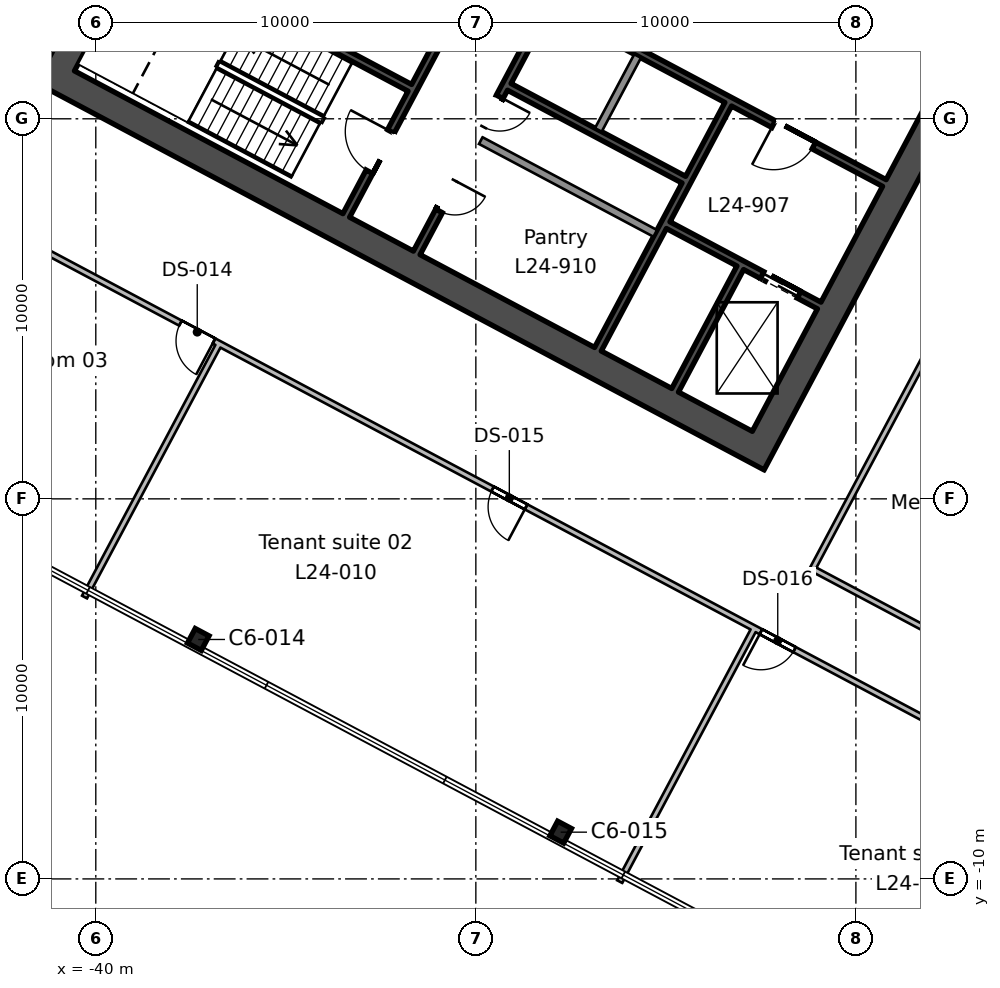
"""IFC4 building model, lengths in metres.
Left out: names, types, materials, properties, quantities, classifications, styles, units other than length and angle.
Written with IfcOpenShell. Run it as: python <this file> out.ifc"""

import sys

from ifc_helpers import new_model, si_unit, direction, frame, frame_2d, origin, origin_2d, place, context, subcontext, project, spatial, rectangle, i_section, extrude, element, fill, save


model = new_model("IFC4")
c1 = context("Model", 3, precision=1e-05, world=origin(), true_north=direction((0.0, 1.0)))
c2 = subcontext(c1, "Body", "Model", "MODEL_VIEW")
j1 = project(units=[si_unit("LENGTHUNIT", "METRE"), si_unit("PLANEANGLEUNIT", "RADIAN")], contexts=[c1])
p1 = place(None, origin())
s1 = spatial("IfcSite", under=j1, at=p1, CompositionType="ELEMENT")
p2 = place(p1, origin())
s2 = spatial("IfcBuilding", under=s1, at=p2, CompositionType="ELEMENT")
p3 = place(p2, frame((0.0, 0.0, 122.2)))
s3 = spatial("IfcBuildingStorey", under=s2, at=p3, CompositionType="ELEMENT", Elevation=122.2)
for number, where, z_axis, x_axis in (
    (1, (-27.768, -8.77, 0.0), (0.0, 0.0, 1.0), (0.883, -0.469, 0.0)),
    (2, (-37.304, -3.7, 0.0), (0.0, 0.0, 1.0), (0.883, -0.469, 0.0)),
):
    element("IfcColumn", number, at=place(p3, frame(where, z_axis=z_axis, x_axis=x_axis)), inside=s3, PredefinedType="COLUMN", context=c2, shape_type="SweptSolid", body=[
        extrude(i_section(OverallWidth=0.412, OverallDepth=0.434, WebThickness=0.036, FlangeThickness=0.057, FilletRadius=0.015, at=origin_2d()), origin(), (0.0, 0.0, 1.0), 4.0),
    ])
p4 = place(p3, frame((-13.498, 18.333, 0.0), z_axis=(0.0, 0.0, 1.0), x_axis=(-0.469469918705, -0.88294846703, 0.0)))
e3 = element("IfcWall", 3, at=p4, inside=s3, PredefinedType="SHEAR", context=c2, shape_type="SweptSolid", body=[
    extrude(rectangle(XDim=19.7, YDim=0.75, at=frame_2d((9.85, 0.0))), origin(), (0.0, 0.0, 1.0), 4.0),
])
p5 = place(p4, frame((6.85, 0.0, 0.0)))
e4 = element("IfcOpeningElement", 4, at=p5, cuts=e3, PredefinedType="OPENING", context=c2, shape_type="SweptSolid", body=[
    extrude(rectangle(XDim=2.4, YDim=2.4, at=frame_2d((1.2, 1.2))), frame((0.0, 0.385, 0.0), z_axis=(0.0, -1.0, 0.0), x_axis=(1.0, 0.0, 0.0)), (0.0, 0.0, 1.0), 0.77),
])
p6 = place(p3, frame((-31.996, 28.168, 0.0), z_axis=(0.0, 0.0, 1.0), x_axis=(-0.469479580143, -0.882943329908, 0.0)))
e5 = element("IfcWall", 5, at=p6, inside=s3, PredefinedType="SHEAR", context=c2, shape_type="SweptSolid", body=[
    extrude(rectangle(XDim=19.7, YDim=0.75, at=frame_2d((9.85, 0.0))), origin(), (0.0, 0.0, 1.0), 4.0),
])
p7 = place(p6, frame((10.45, 0.0, 0.0)))
e6 = element("IfcOpeningElement", 6, at=p7, cuts=e5, PredefinedType="OPENING", context=c2, shape_type="SweptSolid", body=[
    extrude(rectangle(XDim=2.4, YDim=2.4, at=frame_2d((1.2, 1.2))), frame((0.0, 0.385, 0.0), z_axis=(0.0, -1.0, 0.0), x_axis=(1.0, 0.0, 0.0)), (0.0, 0.0, 1.0), 0.77),
])
p8 = place(p3, frame((-22.902, 1.446, 0.0), z_axis=(0.0, 0.0, 1.0), x_axis=(-0.88294509198, 0.469476266226, 0.0)))
e7 = element("IfcWall", 7, at=p8, inside=s3, PredefinedType="SHEAR", context=c2, shape_type="SweptSolid", body=[
    extrude(rectangle(XDim=20.2, YDim=0.75, at=frame_2d((10.1, 0.0))), origin(), (0.0, 0.0, 1.0), 4.0),
])
p9 = place(p3, frame((-23.043, 6.08, 0.0), z_axis=(0.0, 0.0, 1.0), x_axis=(-0.469494272526, -0.882935517501, 0.0)))
e8 = element("IfcWall", 8, at=p9, inside=s3, PredefinedType="SHEAR", context=c2, shape_type="SweptSolid", body=[
    extrude(rectangle(XDim=3.65, YDim=0.2, at=frame_2d((1.825, 0.0))), origin(), (0.0, 0.0, 1.0), 4.0),
])
p10 = place(p3, frame((-23.36, 10.382, 0.0), z_axis=(0.0, 0.0, 1.0), x_axis=(-0.469480409012, -0.88294288918, 0.0)))
e9 = element("IfcWall", 9, at=p10, inside=s3, PredefinedType="SHEAR", context=c2, shape_type="SweptSolid", body=[
    extrude(rectangle(XDim=7.3, YDim=0.2, at=frame_2d((3.65, 0.0))), origin(), (0.0, 0.0, 1.0), 4.0),
])
p11 = place(p3, frame((-25.744, 11.65, 0.0), z_axis=(0.0, 0.0, 1.0), x_axis=(-0.469487830541, -0.882938942948, 0.0)))
e10 = element("IfcWall", 10, at=p11, inside=s3, PredefinedType="SOLIDWALL", context=c2, shape_type="SweptSolid", body=[
    extrude(rectangle(XDim=2.2, YDim=0.2, at=frame_2d((1.1, 0.0))), origin(), (0.0, 0.0, 1.0), 4.0),
])
p12 = place(p3, frame((-28.128, 12.917, 0.0), z_axis=(0.0, 0.0, 1.0), x_axis=(-0.469454336211, -0.882956752176, 0.0)))
e11 = element("IfcWall", 11, at=p12, inside=s3, PredefinedType="SHEAR", context=c2, shape_type="SweptSolid", body=[
    extrude(rectangle(XDim=7.3, YDim=0.2, at=frame_2d((3.65, 0.0))), origin(), (0.0, 0.0, 1.0), 4.0),
])
p13 = place(p12, frame((2.65, 0.0, 0.0)))
e12 = element("IfcOpeningElement", 12, at=p13, cuts=e11, PredefinedType="OPENING", context=c2, shape_type="SweptSolid", body=[
    extrude(rectangle(XDim=0.9, YDim=2.1, at=frame_2d((0.45, 1.05))), frame((0.0, 0.11, 0.0), z_axis=(0.0, -1.0, 0.0), x_axis=(1.0, 0.0, 0.0)), (0.0, 0.0, 1.0), 0.22),
])
p14 = place(p12, frame((5.15, 0.0, 0.0)))
e13 = element("IfcOpeningElement", 13, at=p14, cuts=e11, PredefinedType="OPENING", context=c2, shape_type="SweptSolid", body=[
    extrude(rectangle(XDim=0.9, YDim=2.1, at=frame_2d((0.45, 1.05))), frame((0.0, 0.11, 0.0), z_axis=(0.0, -1.0, 0.0), x_axis=(1.0, 0.0, 0.0)), (0.0, 0.0, 1.0), 0.22),
])
p15 = place(p3, frame((-29.982, 13.903, 0.0), z_axis=(0.0, 0.0, 1.0), x_axis=(-0.469454336211, -0.882956752176, 0.0)))
e14 = element("IfcWall", 14, at=p15, inside=s3, PredefinedType="SHEAR", context=c2, shape_type="SweptSolid", body=[
    extrude(rectangle(XDim=7.3, YDim=0.2, at=frame_2d((3.65, 0.0))), origin(), (0.0, 0.0, 1.0), 4.0),
])
p16 = place(p15, frame((4.8, 0.0, 0.0)))
e15 = element("IfcOpeningElement", 15, at=p16, cuts=e14, PredefinedType="OPENING", context=c2, shape_type="SweptSolid", body=[
    extrude(rectangle(XDim=1.2, YDim=2.1, at=frame_2d((0.6, 1.05))), frame((0.0, 0.11, 0.0), z_axis=(0.0, -1.0, 0.0), x_axis=(1.0, 0.0, 0.0)), (0.0, 0.0, 1.0), 0.22),
])
p17 = place(p3, frame((-19.252, 8.311, 0.0), z_axis=(0.0, 0.0, 1.0), x_axis=(-0.882955722218, 0.469456273365, 0.0)))
e16 = element("IfcWall", 16, at=p17, inside=s3, PredefinedType="SHEAR", context=c2, shape_type="SweptSolid", body=[
    extrude(rectangle(XDim=10.0, YDim=0.2, at=frame_2d((5.0, 0.0))), origin(), (0.0, 0.0, 1.0), 4.0),
])
p18 = place(p17, frame((2.1, 0.0, 0.0)))
e17 = element("IfcOpeningElement", 17, at=p18, cuts=e16, PredefinedType="OPENING", context=c2, shape_type="SweptSolid", body=[
    extrude(rectangle(XDim=1.2, YDim=2.1, at=frame_2d((0.6, 1.05))), frame((0.0, 0.11, 0.0), z_axis=(0.0, -1.0, 0.0), x_axis=(1.0, 0.0, 0.0)), (0.0, 0.0, 1.0), 0.22),
])
p19 = place(p3, frame((-24.528, 8.398, 0.0), z_axis=(0.0, 0.0, 1.0), x_axis=(-0.882953967957, 0.469459572775, 0.0)))
e18 = element("IfcWall", 18, at=p19, inside=s3, PredefinedType="SHEAR", context=c2, shape_type="SweptSolid", body=[
    extrude(rectangle(XDim=5.2, YDim=0.2, at=frame_2d((2.6, 0.0))), origin(), (0.0, 0.0, 1.0), 4.0),
])
p20 = place(p3, frame((-20.965, 5.088, 0.0), z_axis=(0.0, 0.0, 1.0), x_axis=(-0.882925986334, 0.469512196493, 0.0)))
e19 = element("IfcWall", 19, at=p20, inside=s3, PredefinedType="SHEAR", context=c2, shape_type="SweptSolid", body=[
    extrude(rectangle(XDim=4.5, YDim=0.2, at=frame_2d((2.25, 0.0))), origin(), (0.0, 0.0, 1.0), 4.0),
])
p21 = place(p20, frame((0.6, 0.0, 0.0)))
e20 = element("IfcOpeningElement", 20, at=p21, cuts=e19, PredefinedType="OPENING", context=c2, shape_type="SweptSolid", body=[
    extrude(rectangle(XDim=1.1, YDim=2.1, at=frame_2d((0.55, 1.05))), frame((0.0, 0.11, 0.0), z_axis=(0.0, -1.0, 0.0), x_axis=(1.0, 0.0, 0.0)), (0.0, 0.0, 1.0), 0.22),
])
p22 = place(p3, frame((-31.737, 10.816, 0.0), z_axis=(0.0, 0.0, 1.0), x_axis=(-0.882940221191, 0.469485426614, 0.0)))
e21 = element("IfcWall", 21, at=p22, inside=s3, PredefinedType="SHEAR", context=c2, shape_type="SweptSolid", body=[
    extrude(rectangle(XDim=8.0, YDim=0.2, at=frame_2d((4.0, 0.0))), origin(), (0.0, 0.0, 1.0), 4.0),
])
p23 = place(p3, frame((-25.28, 6.986, 0.0), z_axis=(0.0, 0.0, 1.0), x_axis=(-0.882934506056, 0.469496174655, 0.0)))
e22 = element("IfcWall", 22, at=p23, inside=s3, PredefinedType="SOLIDWALL", context=c2, shape_type="SweptSolid", body=[
    extrude(rectangle(XDim=5.2, YDim=0.2, at=frame_2d((2.6, 0.0))), origin(), (0.0, 0.0, 1.0), 4.0),
])
p24 = place(p3, frame((-36.752, 4.082, 0.0), z_axis=(0.0, 0.0, 1.0), x_axis=(-0.46955237308, -0.88290462052, 0.0)))
e23 = element("IfcWall", 23, at=p24, inside=s3, PredefinedType="PARTITIONING", context=c2, shape_type="SweptSolid", body=[
    extrude(rectangle(XDim=7.55, YDim=0.15, at=frame_2d((3.775, 0.0))), origin(), (0.0, 0.0, 1.0), 3.64),
])
p25 = place(p3, frame((-33.66, 30.844, 0.0), z_axis=(0.0, 0.0, 1.0), x_axis=(-0.469473234242, -0.882946704128, 0.0)))
e24 = element("IfcWall", 24, at=p25, inside=s3, PredefinedType="PARTITIONING", context=c2, shape_type="SweptSolid", body=[
    extrude(rectangle(XDim=22.862, YDim=0.15, at=frame_2d((11.431, 0.0))), origin(), (0.0, 0.0, 1.0), 3.64),
])
p26 = place(p3, frame((-13.8, -8.122, 0.0), z_axis=(0.0, 0.0, 1.0), x_axis=(-0.882950271686, 0.469466524611, 0.0)))
e25 = element("IfcWall", 25, at=p26, inside=s3, PredefinedType="PARTITIONING", context=c2, shape_type="SweptSolid", body=[
    extrude(rectangle(XDim=34.727, YDim=0.15, at=frame_2d((17.363, 0.0))), origin(), (0.0, 0.0, 1.0), 3.64),
])
p27 = place(p26, frame((26.15, 0.0, 0.0)))
e26 = element("IfcOpeningElement", 26, at=p27, cuts=e25, PredefinedType="OPENING", context=c2, shape_type="SweptSolid", body=[
    extrude(rectangle(XDim=1.0, YDim=2.1, at=frame_2d((0.5, 1.05))), frame((0.0, 0.085, 0.0), z_axis=(0.0, -1.0, 0.0), x_axis=(1.0, 0.0, 0.0)), (0.0, 0.0, 1.0), 0.17),
])
p28 = place(p26, frame((16.85, 0.0, 0.0)))
e27 = element("IfcOpeningElement", 27, at=p28, cuts=e25, PredefinedType="OPENING", context=c2, shape_type="SweptSolid", body=[
    extrude(rectangle(XDim=1.0, YDim=2.1, at=frame_2d((0.5, 1.05))), frame((0.0, 0.085, 0.0), z_axis=(0.0, -1.0, 0.0), x_axis=(1.0, 0.0, 0.0)), (0.0, 0.0, 1.0), 0.17),
])
p29 = place(p26, frame((8.851, 0.0, 0.0)))
e28 = element("IfcOpeningElement", 28, at=p29, cuts=e25, PredefinedType="OPENING", context=c2, shape_type="SweptSolid", body=[
    extrude(rectangle(XDim=1.0, YDim=2.1, at=frame_2d((0.5, 1.05))), frame((0.0, 0.085, 0.0), z_axis=(0.0, -1.0, 0.0), x_axis=(1.0, 0.0, 0.0)), (0.0, 0.0, 1.0), 0.17),
])
p30 = place(p3, frame((-22.67, -3.406, 0.0), z_axis=(0.0, 0.0, 1.0), x_axis=(-0.469451537303, -0.882958240306, 0.0)))
e29 = element("IfcWall", 29, at=p30, inside=s3, PredefinedType="PARTITIONING", context=c2, shape_type="SweptSolid", body=[
    extrude(rectangle(XDim=7.55, YDim=0.15, at=frame_2d((3.775, 0.0))), origin(), (0.0, 0.0, 1.0), 3.64),
])
p31 = place(p3, frame((-21.139, -1.841, 0.0), z_axis=(0.0, 0.0, 1.0), x_axis=(0.46947923089, 0.882943515613, 0.0)))
e30 = element("IfcWall", 30, at=p31, inside=s3, PredefinedType="PARTITIONING", context=c2, shape_type="SweptSolid", body=[
    extrude(rectangle(XDim=23.1, YDim=0.15, at=frame_2d((11.55, 0.0))), origin(), (0.0, 0.0, 1.0), 3.64),
])
p32 = place(p31, frame((11.05, 0.0, 0.0)))
e31 = element("IfcOpeningElement", 31, at=p32, cuts=e30, PredefinedType="OPENING", context=c2, shape_type="SweptSolid", body=[
    extrude(rectangle(XDim=1.0, YDim=2.1, at=frame_2d((0.5, 1.05))), frame((0.0, 0.085, 0.0), z_axis=(0.0, -1.0, 0.0), x_axis=(1.0, 0.0, 0.0)), (0.0, 0.0, 1.0), 0.17),
])
p33 = place(p3, frame((-13.8, -5.744, 0.0), z_axis=(0.0, 0.0, 1.0), x_axis=(-0.882913323819, 0.469536007803, 0.0)))
e32 = element("IfcWall", 32, at=p33, inside=s3, PredefinedType="PARTITIONING", context=c2, shape_type="SweptSolid", body=[
    extrude(rectangle(XDim=8.312, YDim=0.15, at=frame_2d((4.156, 0.0))), origin(), (0.0, 0.0, 1.0), 3.64),
])
p34 = place(p18, origin())
e33 = element("IfcDoor", 33, at=p34, inside=s3, OperationType="SINGLE_SWING_RIGHT", PredefinedType="DOOR", context=c2, shape_type="SweptSolid", body=[
    extrude(rectangle(XDim=1.2, YDim=2.1, at=frame_2d((0.6, 1.05))), frame((0.0, 0.025, 0.0), z_axis=(0.0, -1.0, 0.0), x_axis=(1.0, 0.0, 0.0)), (0.0, 0.0, 1.0), 0.05),
])
fill(e17, e33)
p35 = place(p16, frame((1.2, 0.0, 0.0), z_axis=(0.0, 0.0, 1.0), x_axis=(-1.0, 0.0, 0.0)))
e34 = element("IfcDoor", 34, at=p35, inside=s3, OperationType="SINGLE_SWING_RIGHT", PredefinedType="DOOR", context=c2, shape_type="SweptSolid", body=[
    extrude(rectangle(XDim=1.2, YDim=2.1, at=frame_2d((0.6, 1.05))), frame((0.0, 0.025, 0.0), z_axis=(0.0, -1.0, 0.0), x_axis=(1.0, 0.0, 0.0)), (0.0, 0.0, 1.0), 0.05),
])
fill(e15, e34)
p36 = place(p21, origin())
e35 = element("IfcDoor", 35, at=p36, inside=s3, OperationType="DOUBLE_DOOR_SLIDING", PredefinedType="DOOR", context=c2, shape_type="SweptSolid", body=[
    extrude(rectangle(XDim=1.1, YDim=2.1, at=frame_2d((0.55, 1.05))), frame((0.0, 0.025, 0.0), z_axis=(0.0, -1.0, 0.0), x_axis=(1.0, 0.0, 0.0)), (0.0, 0.0, 1.0), 0.05),
])
fill(e20, e35)
p37 = place(p13, origin())
e36 = element("IfcDoor", 36, at=p37, inside=s3, OperationType="SINGLE_SWING_LEFT", PredefinedType="DOOR", context=c2, shape_type="SweptSolid", body=[
    extrude(rectangle(XDim=0.9, YDim=2.1, at=frame_2d((0.45, 1.05))), frame((0.0, 0.025, 0.0), z_axis=(0.0, -1.0, 0.0), x_axis=(1.0, 0.0, 0.0)), (0.0, 0.0, 1.0), 0.05),
])
fill(e12, e36)
p38 = place(p14, origin())
e37 = element("IfcDoor", 37, at=p38, inside=s3, OperationType="SINGLE_SWING_LEFT", PredefinedType="DOOR", context=c2, shape_type="SweptSolid", body=[
    extrude(rectangle(XDim=0.9, YDim=2.1, at=frame_2d((0.45, 1.05))), frame((0.0, 0.025, 0.0), z_axis=(0.0, -1.0, 0.0), x_axis=(1.0, 0.0, 0.0)), (0.0, 0.0, 1.0), 0.05),
])
fill(e13, e37)
p39 = place(p27, origin())
e38 = element("IfcDoor", 38, at=p39, inside=s3, OperationType="SINGLE_SWING_LEFT", PredefinedType="DOOR", context=c2, shape_type="SweptSolid", body=[
    extrude(rectangle(XDim=1.0, YDim=2.1, at=frame_2d((0.5, 1.05))), frame((0.0, 0.025, 0.0), z_axis=(0.0, -1.0, 0.0), x_axis=(1.0, 0.0, 0.0)), (0.0, 0.0, 1.0), 0.05),
])
fill(e26, e38)
p40 = place(p28, origin())
e39 = element("IfcDoor", 39, at=p40, inside=s3, OperationType="SINGLE_SWING_LEFT", PredefinedType="DOOR", context=c2, shape_type="SweptSolid", body=[
    extrude(rectangle(XDim=1.0, YDim=2.1, at=frame_2d((0.5, 1.05))), frame((0.0, 0.025, 0.0), z_axis=(0.0, -1.0, 0.0), x_axis=(1.0, 0.0, 0.0)), (0.0, 0.0, 1.0), 0.05),
])
fill(e27, e39)
p41 = place(p29, origin())
e40 = element("IfcDoor", 40, at=p41, inside=s3, OperationType="SINGLE_SWING_RIGHT", PredefinedType="DOOR", context=c2, shape_type="SweptSolid", body=[
    extrude(rectangle(XDim=1.0, YDim=2.1, at=frame_2d((0.5, 1.05))), frame((0.0, 0.025, 0.0), z_axis=(0.0, -1.0, 0.0), x_axis=(1.0, 0.0, 0.0)), (0.0, 0.0, 1.0), 0.05),
])
fill(e28, e40)
save(model, sys.argv[1])
